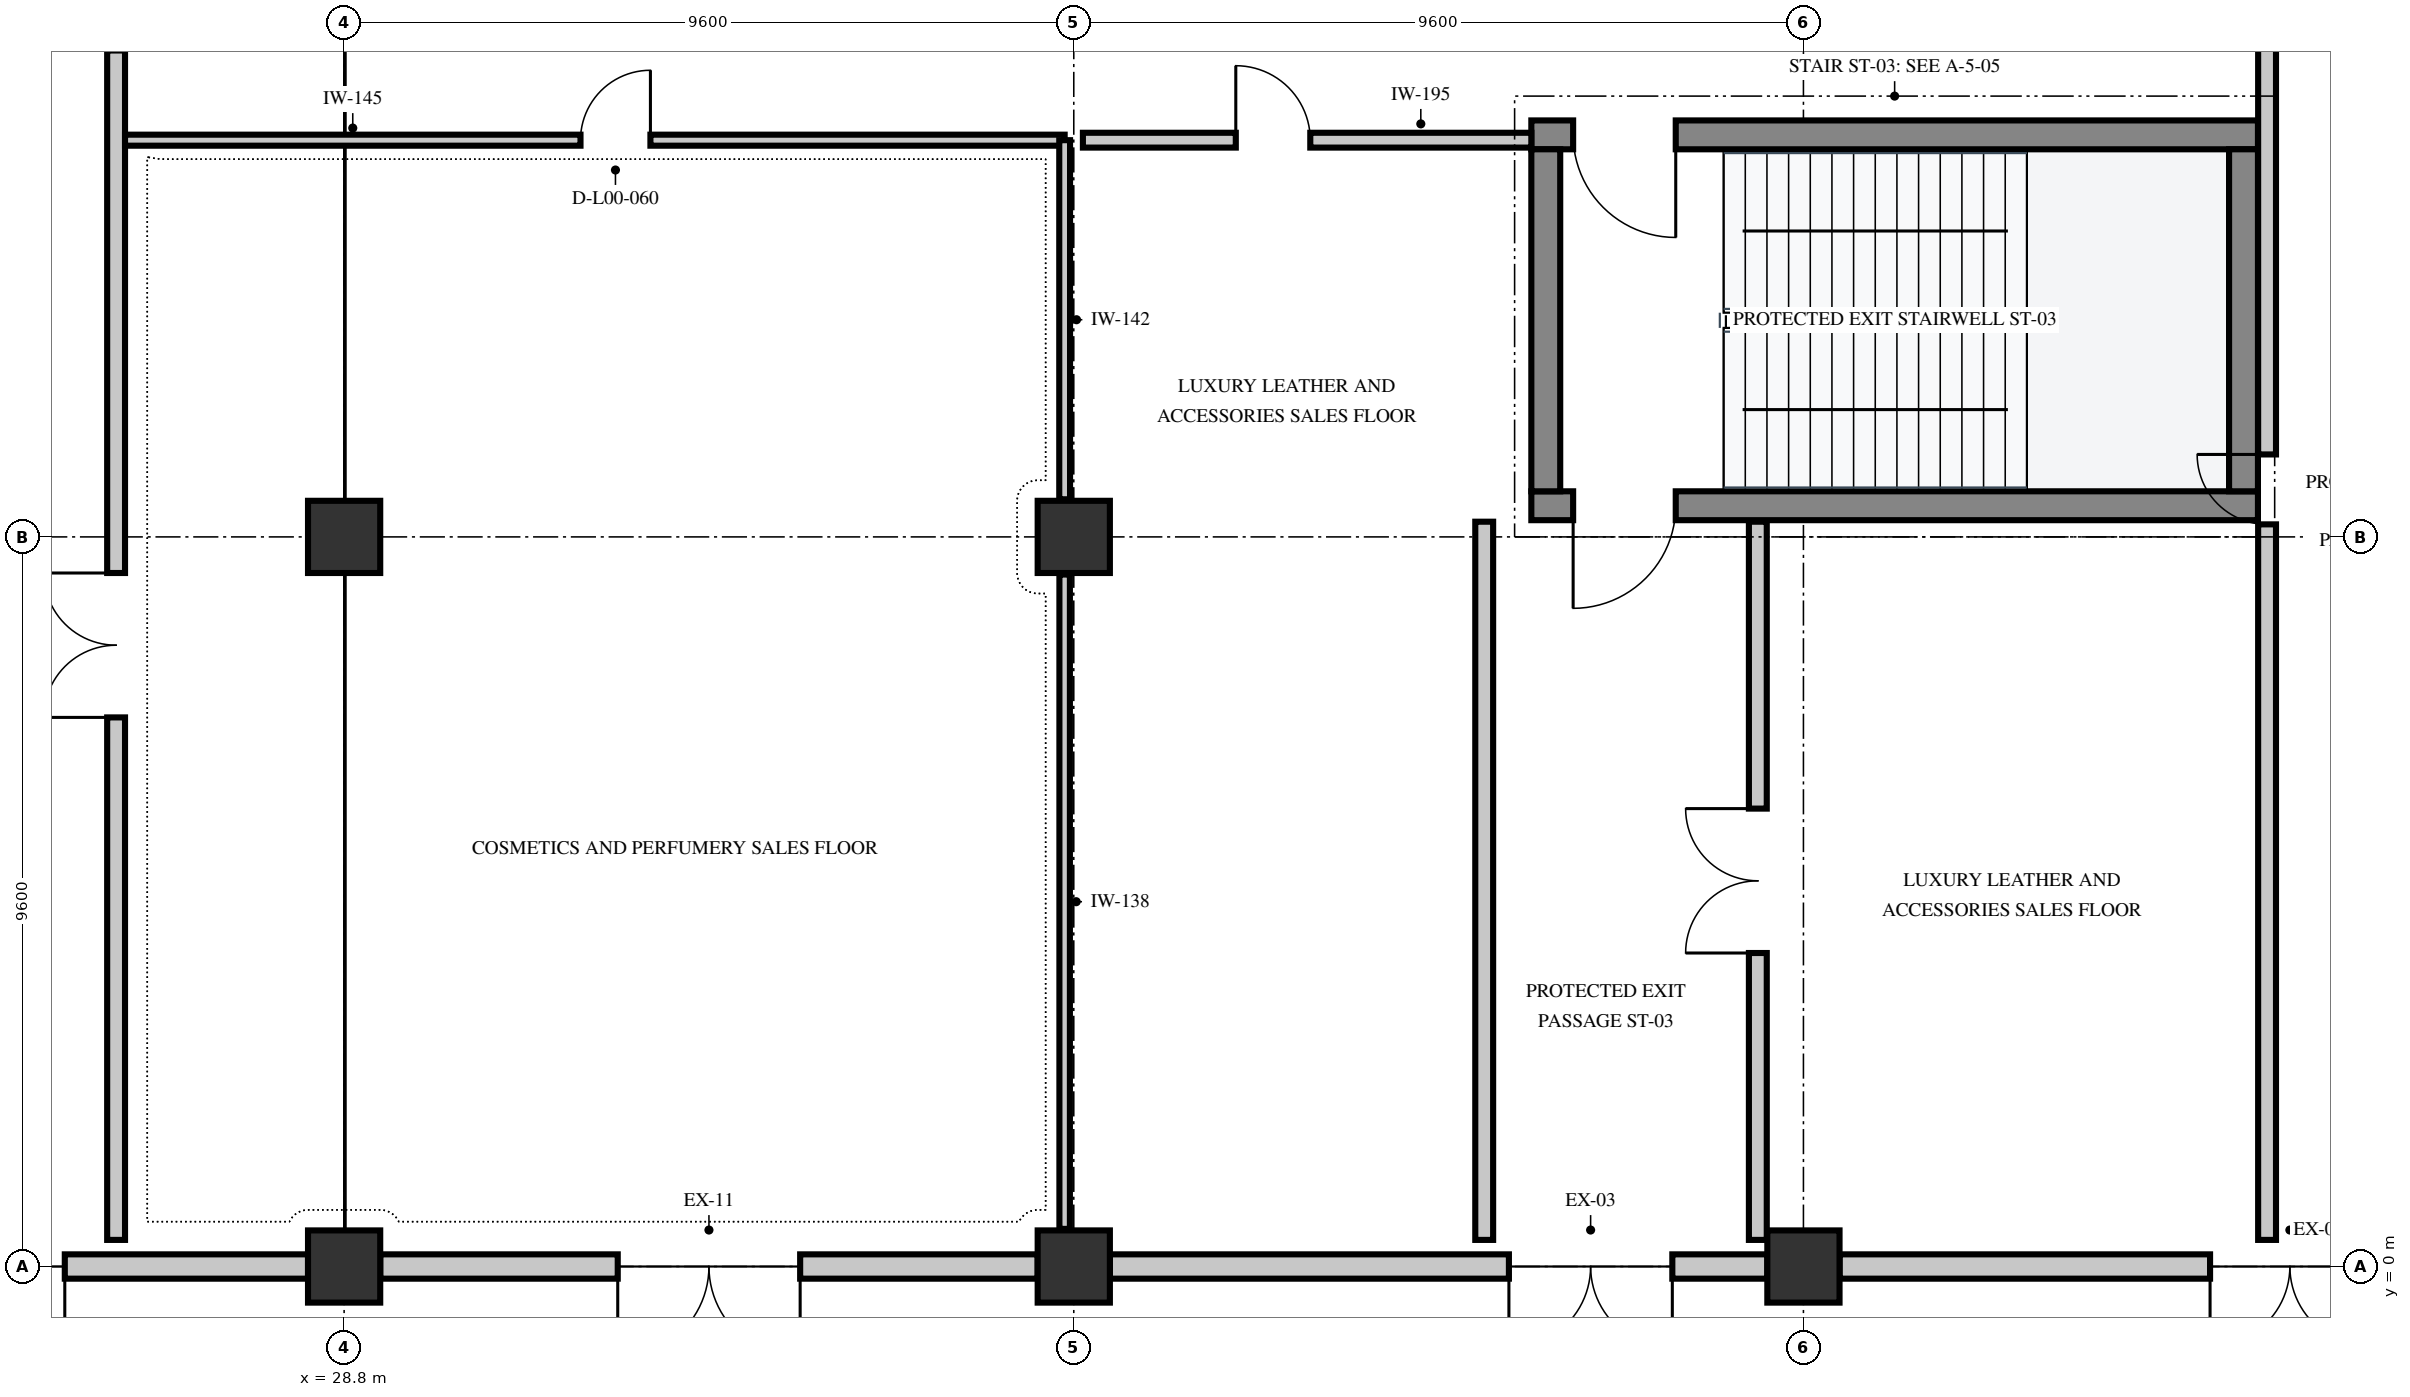
"""IFC4 building model, lengths in metres.
Left out: names, types, materials, properties, quantities, classifications, styles, units other than length and angle.
Written with IfcOpenShell. Run it as: python <this file> out.ifc"""

import sys

from ifc_helpers import new_model, si_unit, direction, frame, frame_2d, origin, origin_2d, place, context, subcontext, project, spatial, rectangle, extrude, element, fill, save


model = new_model("IFC4")
c1 = context("Model", 3, precision=1e-05, world=origin(), true_north=direction((0.0, 1.0)))
c2 = subcontext(c1, "Body", "Model", "MODEL_VIEW")
j1 = project(units=[si_unit("LENGTHUNIT", "METRE"), si_unit("PLANEANGLEUNIT", "RADIAN")], contexts=[c1])
p1 = place(None, origin())
s1 = spatial("IfcSite", under=j1, at=p1, CompositionType="ELEMENT")
p2 = place(p1, origin())
s2 = spatial("IfcBuilding", under=s1, at=p2, CompositionType="ELEMENT")
p3 = place(p2, origin())
s3 = spatial("IfcBuildingStorey", under=s2, at=p3, CompositionType="ELEMENT", Elevation=0.0)
for number, where, z_axis, x_axis in (
    (1, (28.8, 0.0, 0.0), (0.0, 0.0, 1.0), (1.0, 0.0, 0.0)),
    (2, (28.8, 9.6, 0.0), (0.0, 0.0, 1.0), (1.0, 0.0, 0.0)),
    (3, (38.4, 0.0, 0.0), (0.0, 0.0, 1.0), (1.0, 0.0, 0.0)),
    (4, (38.4, 9.6, 0.0), (0.0, 0.0, 1.0), (1.0, 0.0, 0.0)),
    (5, (48.0, 0.0, 0.0), (0.0, 0.0, 1.0), (1.0, 0.0, 0.0)),
):
    element("IfcColumn", number, at=place(p3, frame(where, z_axis=z_axis, x_axis=x_axis)), inside=s3, PredefinedType="COLUMN", context=c2, shape_type="SweptSolid", body=[
        extrude(rectangle(XDim=0.95, YDim=0.95, at=origin_2d()), origin(), (0.0, 0.0, 1.0), 5.4),
    ])
p4 = place(p3, frame((57.125, 0.0, 0.0), z_axis=(0.0, 0.0, 1.0), x_axis=(-1.0, 0.0, 0.0)))
e6 = element("IfcWall", 6, at=p4, inside=s3, PredefinedType="SOLIDWALL", context=c2, shape_type="SweptSolid", body=[
    extrude(rectangle(XDim=8.65, YDim=0.32, at=frame_2d((4.325, 0.0))), origin(), (0.0, 0.0, 1.0), 5.09),
])
p5 = place(p4, frame((1.675, 0.0, 0.0)))
e7 = element("IfcOpeningElement", 7, at=p5, cuts=e6, PredefinedType="OPENING", context=c2, shape_type="SweptSolid", body=[
    extrude(rectangle(XDim=2.1, YDim=2.35, at=frame_2d((1.05, 1.175))), frame((0.0, 0.172, 0.0), z_axis=(0.0, -1.0, 0.0), x_axis=(1.0, 0.0, 0.0)), (0.0, 0.0, 1.0), 0.344),
])
p6 = place(p3, frame((47.525, 0.0, 0.0), z_axis=(0.0, 0.0, 1.0), x_axis=(-1.0, 0.0, 0.0)))
e8 = element("IfcWall", 8, at=p6, inside=s3, PredefinedType="SOLIDWALL", context=c2, shape_type="SweptSolid", body=[
    extrude(rectangle(XDim=8.65, YDim=0.32, at=frame_2d((4.325, 0.0))), origin(), (0.0, 0.0, 1.0), 5.09),
])
p7 = place(p6, frame((1.25, 0.0, 0.0)))
e9 = element("IfcOpeningElement", 9, at=p7, cuts=e8, PredefinedType="OPENING", context=c2, shape_type="SweptSolid", body=[
    extrude(rectangle(XDim=2.15, YDim=2.3, at=frame_2d((1.075, 1.15))), frame((0.0, 0.172, 0.0), z_axis=(0.0, -1.0, 0.0), x_axis=(1.0, 0.0, 0.0)), (0.0, 0.0, 1.0), 0.344),
])
p8 = place(p3, frame((37.925, 0.0, 0.0), z_axis=(0.0, 0.0, 1.0), x_axis=(-1.0, 0.0, 0.0)))
e10 = element("IfcWall", 10, at=p8, inside=s3, PredefinedType="SOLIDWALL", context=c2, shape_type="SweptSolid", body=[
    extrude(rectangle(XDim=8.65, YDim=0.32, at=frame_2d((4.325, 0.0))), origin(), (0.0, 0.0, 1.0), 5.09),
])
p9 = place(p8, frame((3.125, 0.0, 0.0)))
e11 = element("IfcOpeningElement", 11, at=p9, cuts=e10, PredefinedType="OPENING", context=c2, shape_type="SweptSolid", body=[
    extrude(rectangle(XDim=2.4, YDim=2.6, at=frame_2d((1.2, 1.3))), frame((0.0, 0.172, 0.0), z_axis=(0.0, -1.0, 0.0), x_axis=(1.0, 0.0, 0.0)), (0.0, 0.0, 1.0), 0.344),
])
p10 = place(p3, frame((28.325, 0.0, 0.0), z_axis=(0.0, 0.0, 1.0), x_axis=(-1.0, 0.0, 0.0)))
e12 = element("IfcWall", 12, at=p10, inside=s3, PredefinedType="SOLIDWALL", context=c2, shape_type="SweptSolid", body=[
    extrude(rectangle(XDim=8.65, YDim=0.32, at=frame_2d((4.325, 0.0))), origin(), (0.0, 0.0, 1.0), 5.09),
])
p11 = place(p10, frame((3.2, 0.0, 0.0)))
e13 = element("IfcOpeningElement", 13, at=p11, cuts=e12, PredefinedType="OPENING", context=c2, shape_type="SweptSolid", body=[
    extrude(rectangle(XDim=2.25, YDim=2.35, at=frame_2d((1.125, 1.175))), frame((0.0, 0.172, 0.0), z_axis=(0.0, -1.0, 0.0), x_axis=(1.0, 0.0, 0.0)), (0.0, 0.0, 1.0), 0.344),
])
p12 = place(p3, frame((44.42, 10.01, 0.0), z_axis=(0.0, 0.0, 1.0), x_axis=(1.0, 0.0, 0.0)))
e14 = element("IfcWall", 14, at=p12, inside=s3, PredefinedType="SHEAR", context=c2, shape_type="SweptSolid", body=[
    extrude(rectangle(XDim=9.56, YDim=0.38, at=frame_2d((4.78, 0.0))), origin(), (0.0, 0.0, 1.0), 5.09),
])
p13 = place(p12, frame((0.55, 0.0, 0.0)))
e15 = element("IfcOpeningElement", 15, at=p13, cuts=e14, PredefinedType="OPENING", context=c2, shape_type="SweptSolid", body=[
    extrude(rectangle(XDim=1.35, YDim=2.2, at=frame_2d((0.675, 1.1))), frame((0.0, 0.202, 0.0), z_axis=(0.0, -1.0, 0.0), x_axis=(1.0, 0.0, 0.0)), (0.0, 0.0, 1.0), 0.404),
])
p14 = place(p3, frame((44.42, 14.89, 0.0), z_axis=(0.0, 0.0, 1.0), x_axis=(1.0, 0.0, 0.0)))
e16 = element("IfcWall", 16, at=p14, inside=s3, PredefinedType="SHEAR", context=c2, shape_type="SweptSolid", body=[
    extrude(rectangle(XDim=9.56, YDim=0.38, at=frame_2d((4.78, 0.0))), origin(), (0.0, 0.0, 1.0), 5.09),
])
p15 = place(p14, frame((0.55, 0.0, 0.0)))
e17 = element("IfcOpeningElement", 17, at=p15, cuts=e16, PredefinedType="OPENING", context=c2, shape_type="SweptSolid", body=[
    extrude(rectangle(XDim=1.35, YDim=2.2, at=frame_2d((0.675, 1.1))), frame((0.0, 0.202, 0.0), z_axis=(0.0, -1.0, 0.0), x_axis=(1.0, 0.0, 0.0)), (0.0, 0.0, 1.0), 0.404),
])
for number, where, z_axis, x_axis in (
    (18, (53.79, 10.2, 0.0), (0.0, 0.0, 1.0), (0.0, 1.0, 0.0)),
    (19, (44.61, 10.2, 0.0), (0.0, 0.0, 1.0), (0.0, 1.0, 0.0)),
):
    element("IfcWall", number, at=place(p3, frame(where, z_axis=z_axis, x_axis=x_axis)), inside=s3, PredefinedType="SHEAR", context=c2, shape_type="SweptSolid", body=[
        extrude(rectangle(XDim=4.5, YDim=0.38, at=frame_2d((2.25, 0.0))), origin(), (0.0, 0.0, 1.0), 5.09),
    ])
p16 = place(p3, frame((43.8, 0.35, 0.0), z_axis=(0.0, 0.0, 1.0), x_axis=(0.0, 1.0, 0.0)))
e20 = element("IfcWall", 20, at=p16, inside=s3, PredefinedType="PARTITIONING", context=c2, shape_type="SweptSolid", body=[
    extrude(rectangle(XDim=9.45, YDim=0.235, at=frame_2d((4.725, 0.0))), origin(), (0.0, 0.0, 1.0), 5.09),
])
p17 = place(p3, frame((47.4, 0.35, 0.0), z_axis=(0.0, 0.0, 1.0), x_axis=(0.0, 1.0, 0.0)))
e21 = element("IfcWall", 21, at=p17, inside=s3, PredefinedType="PARTITIONING", context=c2, shape_type="SweptSolid", body=[
    extrude(rectangle(XDim=9.45, YDim=0.235, at=frame_2d((4.725, 0.0))), origin(), (0.0, 0.0, 1.0), 5.09),
])
p18 = place(p17, frame((3.775, 0.0, 0.0)))
e22 = element("IfcOpeningElement", 22, at=p18, cuts=e21, PredefinedType="OPENING", context=c2, shape_type="SweptSolid", body=[
    extrude(rectangle(XDim=1.9, YDim=2.25, at=frame_2d((0.95, 1.125))), frame((0.0, 0.129, 0.0), z_axis=(0.0, -1.0, 0.0), x_axis=(1.0, 0.0, 0.0)), (0.0, 0.0, 1.0), 0.259),
])
p19 = place(p3, frame((54.1, 0.35, 0.0), z_axis=(0.0, 0.0, 1.0), x_axis=(0.0, 1.0, 0.0)))
e23 = element("IfcWall", 23, at=p19, inside=s3, PredefinedType="PARTITIONING", context=c2, shape_type="SweptSolid", body=[
    extrude(rectangle(XDim=19.75, YDim=0.235, at=frame_2d((9.875, 0.0))), origin(), (0.0, 0.0, 1.0), 4.03),
])
p20 = place(p19, frame((9.415, 0.0, 0.0)))
e24 = element("IfcOpeningElement", 24, at=p20, cuts=e23, PredefinedType="OPENING", context=c2, shape_type="SweptSolid", body=[
    extrude(rectangle(XDim=0.92, YDim=2.1, at=frame_2d((0.46, 1.05))), frame((0.0, 0.129, 0.0), z_axis=(0.0, -1.0, 0.0), x_axis=(1.0, 0.0, 0.0)), (0.0, 0.0, 1.0), 0.259),
])
p21 = place(p3, frame((25.8, 0.35, 0.0), z_axis=(0.0, 0.0, 1.0), x_axis=(0.0, 1.0, 0.0)))
e25 = element("IfcWall", 25, at=p21, inside=s3, PredefinedType="PARTITIONING", context=c2, shape_type="SweptSolid", body=[
    extrude(rectangle(XDim=15.65, YDim=0.235, at=frame_2d((7.825, 0.0))), origin(), (0.0, 0.0, 1.0), 5.09),
])
p22 = place(p21, frame((6.875, 0.0, 0.0)))
e26 = element("IfcOpeningElement", 26, at=p22, cuts=e25, PredefinedType="OPENING", context=c2, shape_type="SweptSolid", body=[
    extrude(rectangle(XDim=1.9, YDim=2.25, at=frame_2d((0.95, 1.125))), frame((0.0, 0.129, 0.0), z_axis=(0.0, -1.0, 0.0), x_axis=(1.0, 0.0, 0.0)), (0.0, 0.0, 1.0), 0.259),
])
p23 = place(p3, frame((25.917, 14.82, 0.0), z_axis=(0.0, 0.0, 1.0), x_axis=(1.0, 0.0, 0.0)))
e27 = element("IfcWall", 27, at=p23, inside=s3, PredefinedType="PARTITIONING", context=c2, shape_type="SweptSolid", body=[
    extrude(rectangle(XDim=12.363, YDim=0.145, at=frame_2d((6.181, 0.0))), origin(), (0.0, 0.0, 1.0), 4.03),
])
p24 = place(p23, frame((5.992, 0.0, 0.0)))
e28 = element("IfcOpeningElement", 28, at=p24, cuts=e27, PredefinedType="OPENING", context=c2, shape_type="SweptSolid", body=[
    extrude(rectangle(XDim=0.92, YDim=2.1, at=frame_2d((0.46, 1.05))), frame((0.0, 0.084, 0.0), z_axis=(0.0, -1.0, 0.0), x_axis=(1.0, 0.0, 0.0)), (0.0, 0.0, 1.0), 0.169),
])
p25 = place(p3, frame((38.28, 14.82, 0.0), z_axis=(0.0, 0.0, 1.0), x_axis=(0.0, -1.0, 0.0)))
e29 = element("IfcWall", 29, at=p25, inside=s3, PredefinedType="PARTITIONING", context=c2, shape_type="SweptSolid", body=[
    extrude(rectangle(XDim=4.725, YDim=0.142, at=frame_2d((2.363, 0.0))), origin(), (0.0, 0.0, 1.0), 4.03),
])
p26 = place(p3, frame((38.28, 9.105, 0.0), z_axis=(0.0, 0.0, 1.0), x_axis=(0.0, -1.0, 0.0)))
e30 = element("IfcWall", 30, at=p26, inside=s3, PredefinedType="PARTITIONING", context=c2, shape_type="SweptSolid", body=[
    extrude(rectangle(XDim=8.61, YDim=0.138, at=frame_2d((4.305, 0.0))), origin(), (0.0, 0.0, 1.0), 4.03),
])
p27 = place(p3, frame((38.52, 14.82, 0.0), z_axis=(0.0, 0.0, 1.0), x_axis=(1.0, 0.0, 0.0)))
e31 = element("IfcWall", 31, at=p27, inside=s3, PredefinedType="PARTITIONING", context=c2, shape_type="SweptSolid", body=[
    extrude(rectangle(XDim=5.9, YDim=0.195, at=frame_2d((2.95, 0.0))), origin(), (0.0, 0.0, 1.0), 4.03),
])
p28 = place(p27, frame((2.012, 0.0, 0.0)))
e32 = element("IfcOpeningElement", 32, at=p28, cuts=e31, PredefinedType="OPENING", context=c2, shape_type="SweptSolid", body=[
    extrude(rectangle(XDim=0.98, YDim=2.15, at=frame_2d((0.49, 1.075))), frame((0.0, 0.109, 0.0), z_axis=(0.0, -1.0, 0.0), x_axis=(1.0, 0.0, 0.0)), (0.0, 0.0, 1.0), 0.219),
])
p29 = place(p5, origin())
e33 = element("IfcDoor", 33, at=p29, inside=s3, OperationType="DOUBLE_DOOR_SINGLE_SWING", PredefinedType="DOOR", context=c2, shape_type="SweptSolid", body=[
    extrude(rectangle(XDim=2.1, YDim=2.35, at=frame_2d((1.05, 1.175))), frame((0.0, 0.025, 0.0), z_axis=(0.0, -1.0, 0.0), x_axis=(1.0, 0.0, 0.0)), (0.0, 0.0, 1.0), 0.05),
])
fill(e7, e33)
p30 = place(p7, origin())
e34 = element("IfcDoor", 34, at=p30, inside=s3, OperationType="DOUBLE_DOOR_SINGLE_SWING", PredefinedType="DOOR", context=c2, shape_type="SweptSolid", body=[
    extrude(rectangle(XDim=2.15, YDim=2.3, at=frame_2d((1.075, 1.15))), frame((0.0, 0.025, 0.0), z_axis=(0.0, -1.0, 0.0), x_axis=(1.0, 0.0, 0.0)), (0.0, 0.0, 1.0), 0.05),
])
fill(e9, e34)
p31 = place(p9, origin())
e35 = element("IfcDoor", 35, at=p31, inside=s3, OperationType="DOUBLE_DOOR_SINGLE_SWING", PredefinedType="DOOR", context=c2, shape_type="SweptSolid", body=[
    extrude(rectangle(XDim=2.4, YDim=2.6, at=frame_2d((1.2, 1.3))), frame((0.0, 0.025, 0.0), z_axis=(0.0, -1.0, 0.0), x_axis=(1.0, 0.0, 0.0)), (0.0, 0.0, 1.0), 0.05),
])
fill(e11, e35)
p32 = place(p11, origin())
e36 = element("IfcDoor", 36, at=p32, inside=s3, OperationType="DOUBLE_DOOR_SINGLE_SWING", PredefinedType="DOOR", context=c2, shape_type="SweptSolid", body=[
    extrude(rectangle(XDim=2.25, YDim=2.35, at=frame_2d((1.125, 1.175))), frame((0.0, 0.025, 0.0), z_axis=(0.0, -1.0, 0.0), x_axis=(1.0, 0.0, 0.0)), (0.0, 0.0, 1.0), 0.05),
])
fill(e13, e36)
p33 = place(p15, frame((1.35, 0.0, 0.0), z_axis=(0.0, 0.0, 1.0), x_axis=(-1.0, 0.0, 0.0)))
e37 = element("IfcDoor", 37, at=p33, inside=s3, OperationType="SINGLE_SWING_LEFT", PredefinedType="DOOR", context=c2, shape_type="SweptSolid", body=[
    extrude(rectangle(XDim=1.35, YDim=2.2, at=frame_2d((0.675, 1.1))), frame((0.0, 0.025, 0.0), z_axis=(0.0, -1.0, 0.0), x_axis=(1.0, 0.0, 0.0)), (0.0, 0.0, 1.0), 0.05),
])
fill(e17, e37)
p34 = place(p13, frame((1.35, 0.0, 0.0), z_axis=(0.0, 0.0, 1.0), x_axis=(-1.0, 0.0, 0.0)))
e38 = element("IfcDoor", 38, at=p34, inside=s3, OperationType="SINGLE_SWING_RIGHT", PredefinedType="DOOR", context=c2, shape_type="SweptSolid", body=[
    extrude(rectangle(XDim=1.35, YDim=2.2, at=frame_2d((0.675, 1.1))), frame((0.0, 0.025, 0.0), z_axis=(0.0, -1.0, 0.0), x_axis=(1.0, 0.0, 0.0)), (0.0, 0.0, 1.0), 0.05),
])
fill(e15, e38)
p35 = place(p18, origin())
e39 = element("IfcDoor", 39, at=p35, inside=s3, OperationType="DOUBLE_DOOR_SINGLE_SWING", PredefinedType="DOOR", context=c2, shape_type="SweptSolid", body=[
    extrude(rectangle(XDim=1.9, YDim=2.25, at=frame_2d((0.95, 1.125))), frame((0.0, 0.025, 0.0), z_axis=(0.0, -1.0, 0.0), x_axis=(1.0, 0.0, 0.0)), (0.0, 0.0, 1.0), 0.05),
])
fill(e22, e39)
p36 = place(p22, origin())
e40 = element("IfcDoor", 40, at=p36, inside=s3, OperationType="DOUBLE_DOOR_SINGLE_SWING", PredefinedType="DOOR", context=c2, shape_type="SweptSolid", body=[
    extrude(rectangle(XDim=1.9, YDim=2.25, at=frame_2d((0.95, 1.125))), frame((0.0, 0.025, 0.0), z_axis=(0.0, -1.0, 0.0), x_axis=(1.0, 0.0, 0.0)), (0.0, 0.0, 1.0), 0.05),
])
fill(e26, e40)
p37 = place(p24, origin())
e41 = element("IfcDoor", 41, at=p37, inside=s3, OperationType="SINGLE_SWING_RIGHT", PredefinedType="DOOR", context=c2, shape_type="SweptSolid", body=[
    extrude(rectangle(XDim=0.92, YDim=2.1, at=frame_2d((0.46, 1.05))), frame((0.0, 0.025, 0.0), z_axis=(0.0, -1.0, 0.0), x_axis=(1.0, 0.0, 0.0)), (0.0, 0.0, 1.0), 0.05),
])
fill(e28, e41)
p38 = place(p20, origin())
e42 = element("IfcDoor", 42, at=p38, inside=s3, OperationType="SINGLE_SWING_RIGHT", PredefinedType="DOOR", context=c2, shape_type="SweptSolid", body=[
    extrude(rectangle(XDim=0.92, YDim=2.1, at=frame_2d((0.46, 1.05))), frame((0.0, 0.025, 0.0), z_axis=(0.0, -1.0, 0.0), x_axis=(1.0, 0.0, 0.0)), (0.0, 0.0, 1.0), 0.05),
])
fill(e24, e42)
p39 = place(p28, origin())
e43 = element("IfcDoor", 43, at=p39, inside=s3, OperationType="SINGLE_SWING_LEFT", PredefinedType="DOOR", context=c2, shape_type="SweptSolid", body=[
    extrude(rectangle(XDim=0.98, YDim=2.15, at=frame_2d((0.49, 1.075))), frame((0.0, 0.025, 0.0), z_axis=(0.0, -1.0, 0.0), x_axis=(1.0, 0.0, 0.0)), (0.0, 0.0, 1.0), 0.05),
])
fill(e32, e43)
save(model, sys.argv[1])
